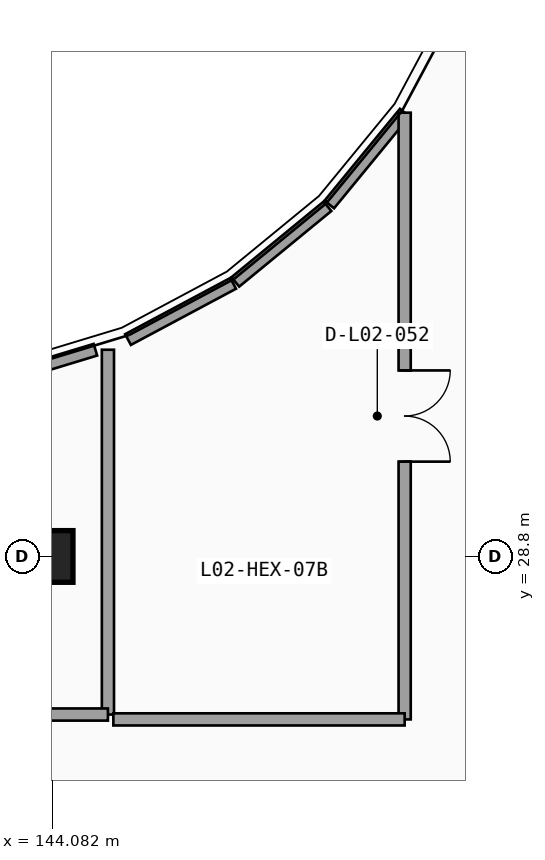
"""IFC4 building model, lengths in metres.
Left out: names, types, materials, properties, quantities, classifications, styles, units other than length and angle.
Written with IfcOpenShell. Run it as: python <this file> out.ifc"""

import sys

from ifc_helpers import new_model, si_unit, direction, frame, frame_2d, origin, origin_2d, place, context, subcontext, project, spatial, rectangle, extrude, element, fill, save


model = new_model("IFC4")
c1 = context("Model", 3, precision=1e-05, world=origin(), true_north=direction((0.0, 1.0)))
c2 = subcontext(c1, "Body", "Model", "MODEL_VIEW")
j1 = project(units=[si_unit("LENGTHUNIT", "METRE"), si_unit("PLANEANGLEUNIT", "RADIAN")], contexts=[c1])
p1 = place(None, origin())
s1 = spatial("IfcSite", under=j1, at=p1, CompositionType="ELEMENT")
p2 = place(p1, origin())
s2 = spatial("IfcBuilding", under=s1, at=p2, CompositionType="ELEMENT")
p3 = place(p2, frame((0.0, 0.0, 9.6)))
s3 = spatial("IfcBuildingStorey", under=s2, at=p3, CompositionType="ELEMENT", Elevation=9.6)
p4 = place(p3, frame((144.0, 28.8, 0.0), z_axis=(0.0, 0.0, 1.0), x_axis=(1.0, 0.0, 0.0)))
e1 = element("IfcColumn", 1, at=p4, inside=s3, PredefinedType="COLUMN", context=c2, shape_type="SweptSolid", body=[
    extrude(rectangle(XDim=0.85, YDim=0.85, at=origin_2d()), origin(), (0.0, 0.0, 1.0), 4.5),
])
p5 = place(p3, frame((143.415, 31.781, 0.0), z_axis=(0.0, 0.0, 1.0), x_axis=(0.956921766266, 0.290345885534, 0.0)))
e2 = element("IfcWall", 2, at=p5, inside=s3, PredefinedType="PARTITIONING", context=c2, shape_type="SweptSolid", body=[
    extrude(rectangle(XDim=1.441, YDim=0.2, at=frame_2d((0.721, 0.0))), origin(), (0.0, 0.0, 1.0), 4.22),
])
p6 = place(p3, frame((145.0, 32.2, 0.0), z_axis=(0.0, 0.0, 1.0), x_axis=(0.0, -1.0, 0.0)))
e3 = element("IfcWall", 3, at=p6, inside=s3, PredefinedType="PARTITIONING", context=c2, shape_type="SweptSolid", body=[
    extrude(rectangle(XDim=6.0, YDim=0.2, at=frame_2d((3.0, 0.0))), origin(), (0.0, 0.0, 1.0), 3.466),
])
p7 = place(p3, frame((145.0, 26.2, 0.0), z_axis=(0.0, 0.0, 1.0), x_axis=(-1.0, 0.0, 0.0)))
e4 = element("IfcWall", 4, at=p7, inside=s3, PredefinedType="PARTITIONING", context=c2, shape_type="SweptSolid", body=[
    extrude(rectangle(XDim=4.62, YDim=0.2, at=frame_2d((2.31, 0.0))), origin(), (0.0, 0.0, 1.0), 3.613),
])
p8 = place(p3, frame((145.331, 32.367, 0.0), z_axis=(0.0, 0.0, 1.0), x_axis=(0.881914706722, 0.471409005076, 0.0)))
e5 = element("IfcWall", 5, at=p8, inside=s3, PredefinedType="PARTITIONING", context=c2, shape_type="SweptSolid", body=[
    extrude(rectangle(XDim=1.96, YDim=0.2, at=frame_2d((0.98, 0.0))), origin(), (0.0, 0.0, 1.0), 4.22),
])
p9 = place(p3, frame((147.095, 33.315, 0.0), z_axis=(0.0, 0.0, 1.0), x_axis=(0.773007598499, 0.634396762809, 0.0)))
e6 = element("IfcWall", 6, at=p9, inside=s3, PredefinedType="PARTITIONING", context=c2, shape_type="SweptSolid", body=[
    extrude(rectangle(XDim=1.96, YDim=0.2, at=frame_2d((0.98, 0.0))), origin(), (0.0, 0.0, 1.0), 4.22),
])
p10 = place(p3, frame((148.641, 34.589, 0.0), z_axis=(0.0, 0.0, 1.0), x_axis=(0.634374086786, 0.773026207844, 0.0)))
e7 = element("IfcWall", 7, at=p10, inside=s3, PredefinedType="PARTITIONING", context=c2, shape_type="SweptSolid", body=[
    extrude(rectangle(XDim=1.953, YDim=0.2, at=frame_2d((0.976, 0.0))), origin(), (0.0, 0.0, 1.0), 4.22),
])
p11 = place(p3, frame((149.88, 36.099, 0.0), z_axis=(0.0, 0.0, 1.0), x_axis=(0.0, -1.0, 0.0)))
e8 = element("IfcWall", 8, at=p11, inside=s3, PredefinedType="PARTITIONING", context=c2, shape_type="SweptSolid", body=[
    extrude(rectangle(XDim=9.979, YDim=0.2, at=frame_2d((4.989, 0.0))), origin(), (0.0, 0.0, 1.0), 3.466),
])
p12 = place(p11, frame((4.24, 0.0, 0.0), z_axis=(0.0, 0.0, 1.0), x_axis=(1.0, 0.0, 0.0)))
e9 = element("IfcOpeningElement", 9, at=p12, cuts=e8, PredefinedType="OPENING", context=c2, shape_type="SweptSolid", body=[
    extrude(rectangle(XDim=1.5, YDim=2.25, at=frame_2d((0.75, 1.125))), frame((0.0, 0.11, 0.0), z_axis=(0.0, -1.0, 0.0), x_axis=(1.0, 0.0, 0.0)), (0.0, 0.0, 1.0), 0.22),
])
p13 = place(p3, frame((149.88, 26.12, 0.0), z_axis=(0.0, 0.0, 1.0), x_axis=(-1.0, 0.0, 0.0)))
e10 = element("IfcWall", 10, at=p13, inside=s3, PredefinedType="PARTITIONING", context=c2, shape_type="SweptSolid", body=[
    extrude(rectangle(XDim=4.791, YDim=0.2, at=frame_2d((2.395, 0.0))), origin(), (0.0, 0.0, 1.0), 4.22),
])
p14 = place(p12, origin())
e11 = element("IfcDoor", 11, at=p14, inside=s3, OperationType="DOUBLE_DOOR_SINGLE_SWING", PredefinedType="DOOR", context=c2, shape_type="SweptSolid", body=[
    extrude(rectangle(XDim=1.5, YDim=2.25, at=frame_2d((0.75, 1.125))), frame((0.0, 0.025, 0.0), z_axis=(0.0, -1.0, 0.0), x_axis=(1.0, 0.0, 0.0)), (0.0, 0.0, 1.0), 0.05),
])
fill(e9, e11)
save(model, sys.argv[1])
